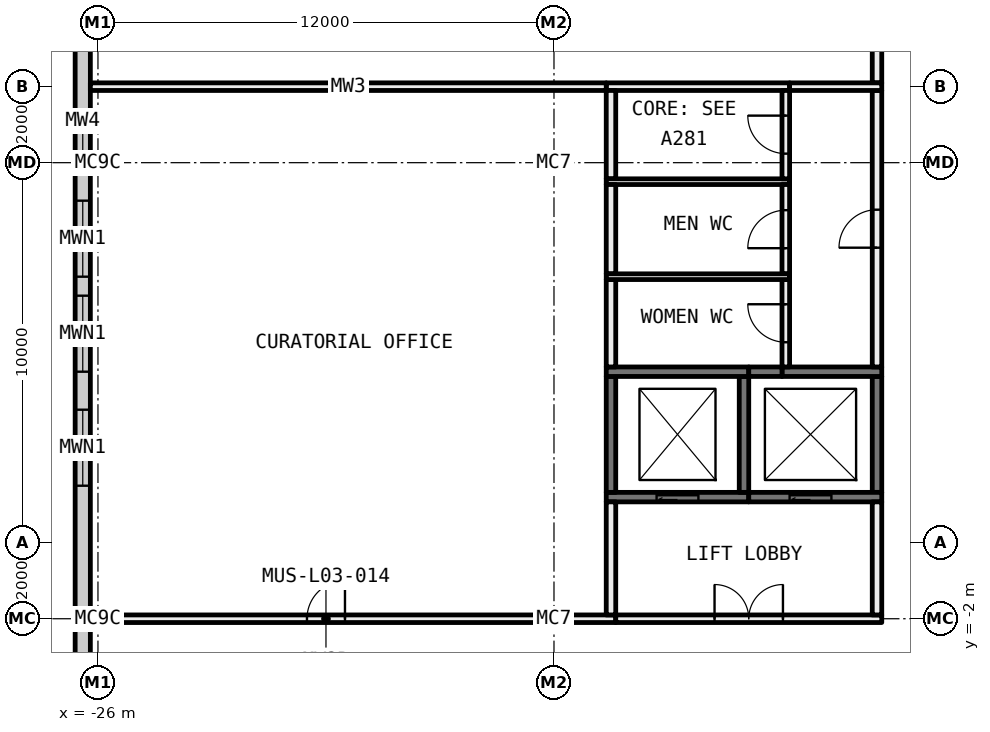
"""IFC4 building model, lengths in metres.
Left out: names, types, materials, properties, quantities, classifications, styles, units other than length and angle.
Written with IfcOpenShell. Run it as: python <this file> out.ifc"""

import sys

from ifc_helpers import new_model, si_unit, direction, frame, frame_2d, origin, origin_2d, place, context, subcontext, project, spatial, rectangle, i_section, extrude, element, fill, save


model = new_model("IFC4")
c1 = context("Model", 3, precision=1e-05, world=origin(), true_north=direction((0.0, 1.0)))
c2 = subcontext(c1, "Body", "Model", "MODEL_VIEW")
j1 = project(units=[si_unit("LENGTHUNIT", "METRE"), si_unit("PLANEANGLEUNIT", "RADIAN")], contexts=[c1])
p1 = place(None, origin())
s1 = spatial("IfcSite", under=j1, at=p1, CompositionType="ELEMENT")
p2 = place(p1, origin())
s2 = spatial("IfcBuilding", under=s1, at=p2, CompositionType="ELEMENT")
p3 = place(p2, frame((0.0, 0.0, 18.0)))
s3 = spatial("IfcBuildingStorey", under=s2, at=p3, CompositionType="ELEMENT", Elevation=18.0)
for number, where, z_axis, x_axis in (
    (1, (-26.0, -2.0, 0.0), (0.0, 0.0, 1.0), (1.0, 0.0, 0.0)),
    (2, (-26.0, 10.0, 0.0), (0.0, 0.0, 1.0), (1.0, 0.0, 0.0)),
):
    element("IfcColumn", number, at=place(p3, frame(where, z_axis=z_axis, x_axis=x_axis)), inside=s3, PredefinedType="COLUMN", context=c2, shape_type="SweptSolid", body=[
        extrude(i_section(OverallWidth=0.4, OverallDepth=0.4, WebThickness=0.013, FlangeThickness=0.021, FilletRadius=0.022, at=origin_2d()), origin(), (0.0, 0.0, 1.0), 5.6),
    ])
for number, where, z_axis, x_axis in (
    (3, (-14.0, -2.0, 0.0), (0.0, 0.0, 1.0), (1.0, 0.0, 0.0)),
    (4, (-14.0, 10.0, 0.0), (0.0, 0.0, 1.0), (1.0, 0.0, 0.0)),
):
    element("IfcColumn", number, at=place(p3, frame(where, z_axis=z_axis, x_axis=x_axis)), inside=s3, PredefinedType="COLUMN", context=c2, shape_type="SweptSolid", body=[
        extrude(i_section(OverallWidth=0.35, OverallDepth=0.35, WebThickness=0.012, FlangeThickness=0.019, FilletRadius=0.013, at=origin_2d()), origin(), (0.0, 0.0, 1.0), 5.6),
    ])
p4 = place(p3, frame((-12.625, 12.0, 0.0), z_axis=(0.0, 0.0, 1.0), x_axis=(1.0, 0.0, 0.0)))
e5 = element("IfcWall", 5, at=p4, inside=s3, PredefinedType="PARTITIONING", context=c2, shape_type="SweptSolid", body=[
    extrude(rectangle(XDim=4.825, YDim=0.2, at=frame_2d((2.413, 0.0))), origin(), (0.0, 0.0, 1.0), 5.6),
])
p5 = place(p3, frame((-12.5, 9.575, 0.0), z_axis=(0.0, 0.0, 1.0), x_axis=(0.0, 1.0, 0.0)))
e6 = element("IfcWall", 6, at=p5, inside=s3, PredefinedType="PARTITIONING", context=c2, shape_type="SweptSolid", body=[
    extrude(rectangle(XDim=2.325, YDim=0.25, at=frame_2d((1.163, 0.0))), origin(), (0.0, 0.0, 1.0), 5.6),
])
p6 = place(p3, frame((-5.5, 12.1, 0.0), z_axis=(0.0, 0.0, 1.0), x_axis=(0.0, 1.0, 0.0)))
e7 = element("IfcWall", 7, at=p6, inside=s3, PredefinedType="PARTITIONING", context=c2, shape_type="SweptSolid", body=[
    extrude(rectangle(XDim=13.825, YDim=0.25, at=frame_2d((6.913, 0.0))), origin(), (0.0, 0.0, 1.0), 5.6),
])
p7 = place(p6, frame((6.413, 0.0, 0.0)))
e8 = element("IfcOpeningElement", 8, at=p7, cuts=e7, PredefinedType="OPENING", context=c2, shape_type="SweptSolid", body=[
    extrude(rectangle(XDim=1.0, YDim=2.1, at=frame_2d((0.5, 1.05))), frame((0.0, 0.135, 0.0), z_axis=(0.0, -1.0, 0.0), x_axis=(1.0, 0.0, 0.0)), (0.0, 0.0, 1.0), 0.27),
])
p8 = place(p3, frame((-25.8, -2.0, 0.0), z_axis=(0.0, 0.0, 1.0), x_axis=(1.0, 0.0, 0.0)))
e9 = element("IfcWall", 9, at=p8, inside=s3, PredefinedType="PARTITIONING", context=c2, shape_type="SweptSolid", body=[
    extrude(rectangle(XDim=11.6, YDim=0.2, at=frame_2d((5.8, 0.0))), origin(), (0.0, 0.0, 1.0), 5.112),
])
p9 = place(p8, frame((5.3, 0.0, 0.0)))
e10 = element("IfcOpeningElement", 10, at=p9, cuts=e9, PredefinedType="OPENING", context=c2, shape_type="SweptSolid", body=[
    extrude(rectangle(XDim=1.0, YDim=2.1, at=frame_2d((0.5, 1.05))), frame((0.0, 0.11, 0.0), z_axis=(0.0, -1.0, 0.0), x_axis=(1.0, 0.0, 0.0)), (0.0, 0.0, 1.0), 0.22),
])
p10 = place(p3, frame((-13.8, -2.0, 0.0), z_axis=(0.0, 0.0, 1.0), x_axis=(1.0, 0.0, 0.0)))
e11 = element("IfcWall", 11, at=p10, inside=s3, PredefinedType="PARTITIONING", context=c2, shape_type="SweptSolid", body=[
    extrude(rectangle(XDim=1.425, YDim=0.2, at=frame_2d((0.712, 0.0))), origin(), (0.0, 0.0, 1.0), 5.112),
])
p11 = place(p3, frame((-12.375, -2.0, 0.0), z_axis=(0.0, 0.0, 1.0), x_axis=(1.0, 0.0, 0.0)))
e12 = element("IfcWall", 12, at=p11, inside=s3, PredefinedType="PARTITIONING", context=c2, shape_type="SweptSolid", body=[
    extrude(rectangle(XDim=7.0, YDim=0.2, at=frame_2d((3.5, 0.0))), origin(), (0.0, 0.0, 1.0), 5.112),
])
p12 = place(p11, frame((2.6, 0.0, 0.0)))
e13 = element("IfcOpeningElement", 13, at=p12, cuts=e12, PredefinedType="OPENING", context=c2, shape_type="SweptSolid", body=[
    extrude(rectangle(XDim=1.8, YDim=2.1, at=frame_2d((0.9, 1.05))), frame((0.0, 0.11, 0.0), z_axis=(0.0, -1.0, 0.0), x_axis=(1.0, 0.0, 0.0)), (0.0, 0.0, 1.0), 0.22),
])
p13 = place(p3, frame((-5.5, -1.9, 0.0), z_axis=(0.0, 0.0, 1.0), x_axis=(0.0, 1.0, 0.0)))
e14 = element("IfcWall", 14, at=p13, inside=s3, PredefinedType="PARTITIONING", context=c2, shape_type="SweptSolid", body=[
    extrude(rectangle(XDim=2.975, YDim=0.25, at=frame_2d((1.487, 0.0))), origin(), (0.0, 0.0, 1.0), 5.6),
])
p14 = place(p3, frame((-5.5, 1.325, 0.0), z_axis=(0.0, 0.0, 1.0), x_axis=(0.0, 1.0, 0.0)))
e15 = element("IfcWall", 15, at=p14, inside=s3, PredefinedType="SHEAR", context=c2, shape_type="SweptSolid", body=[
    extrude(rectangle(XDim=3.05, YDim=0.25, at=frame_2d((1.525, 0.0))), origin(), (0.0, 0.0, 1.0), 5.6),
])
p15 = place(p3, frame((-5.5, 4.625, 0.0), z_axis=(0.0, 0.0, 1.0), x_axis=(0.0, 1.0, 0.0)))
e16 = element("IfcWall", 16, at=p15, inside=s3, PredefinedType="PARTITIONING", context=c2, shape_type="SweptSolid", body=[
    extrude(rectangle(XDim=7.275, YDim=0.25, at=frame_2d((3.637, 0.0))), origin(), (0.0, 0.0, 1.0), 5.6),
])
p16 = place(p15, frame((3.138, 0.0, 0.0)))
e17 = element("IfcOpeningElement", 17, at=p16, cuts=e16, PredefinedType="OPENING", context=c2, shape_type="SweptSolid", body=[
    extrude(rectangle(XDim=1.0, YDim=2.1, at=frame_2d((0.5, 1.05))), frame((0.0, 0.135, 0.0), z_axis=(0.0, -1.0, 0.0), x_axis=(1.0, 0.0, 0.0)), (0.0, 0.0, 1.0), 0.27),
])
p17 = place(p3, frame((-26.2, 12.0, 0.0), z_axis=(0.0, 0.0, 1.0), x_axis=(1.0, 0.0, 0.0)))
e18 = element("IfcWall", 18, at=p17, inside=s3, PredefinedType="PARTITIONING", context=c2, shape_type="SweptSolid", body=[
    extrude(rectangle(XDim=13.575, YDim=0.2, at=frame_2d((6.788, 0.0))), origin(), (0.0, 0.0, 1.0), 5.6),
])
p18 = place(p3, frame((-12.5, -1.9, 0.0), z_axis=(0.0, 0.0, 1.0), x_axis=(0.0, 1.0, 0.0)))
e19 = element("IfcWall", 19, at=p18, inside=s3, PredefinedType="PARTITIONING", context=c2, shape_type="SweptSolid", body=[
    extrude(rectangle(XDim=2.975, YDim=0.25, at=frame_2d((1.487, 0.0))), origin(), (0.0, 0.0, 1.0), 5.6),
])
p19 = place(p3, frame((-12.625, 1.2, 0.0), z_axis=(0.0, 0.0, 1.0), x_axis=(1.0, 0.0, 0.0)))
e20 = element("IfcWall", 20, at=p19, inside=s3, PredefinedType="SHEAR", context=c2, shape_type="SweptSolid", body=[
    extrude(rectangle(XDim=3.75, YDim=0.25, at=frame_2d((1.875, 0.0))), origin(), (0.0, 0.0, 1.0), 5.6),
])
p20 = place(p19, frame((1.325, 0.0, 0.0)))
e21 = element("IfcOpeningElement", 21, at=p20, cuts=e20, PredefinedType="OPENING", context=c2, shape_type="SweptSolid", body=[
    extrude(rectangle(XDim=1.1, YDim=2.1, at=frame_2d((0.55, 1.05))), frame((0.0, 0.135, 0.0), z_axis=(0.0, -1.0, 0.0), x_axis=(1.0, 0.0, 0.0)), (0.0, 0.0, 1.0), 0.27),
])
p21 = place(p3, frame((-8.875, 1.2, 0.0), z_axis=(0.0, 0.0, 1.0), x_axis=(1.0, 0.0, 0.0)))
e22 = element("IfcWall", 22, at=p21, inside=s3, PredefinedType="SHEAR", context=c2, shape_type="SweptSolid", body=[
    extrude(rectangle(XDim=3.5, YDim=0.25, at=frame_2d((1.75, 0.0))), origin(), (0.0, 0.0, 1.0), 5.6),
])
p22 = place(p21, frame((1.075, 0.0, 0.0)))
e23 = element("IfcOpeningElement", 23, at=p22, cuts=e22, PredefinedType="OPENING", context=c2, shape_type="SweptSolid", body=[
    extrude(rectangle(XDim=1.1, YDim=2.1, at=frame_2d((0.55, 1.05))), frame((0.0, 0.135, 0.0), z_axis=(0.0, -1.0, 0.0), x_axis=(1.0, 0.0, 0.0)), (0.0, 0.0, 1.0), 0.27),
])
p23 = place(p3, frame((-12.625, 9.5, 0.0), z_axis=(0.0, 0.0, 1.0), x_axis=(1.0, 0.0, 0.0)))
e24 = element("IfcWall", 24, at=p23, inside=s3, PredefinedType="PARTITIONING", context=c2, shape_type="SweptSolid", body=[
    extrude(rectangle(XDim=4.825, YDim=0.15, at=frame_2d((2.413, 0.0))), origin(), (0.0, 0.0, 1.0), 5.6),
])
p24 = place(p3, frame((-12.5, 7.075, 0.0), z_axis=(0.0, 0.0, 1.0), x_axis=(0.0, 1.0, 0.0)))
e25 = element("IfcWall", 25, at=p24, inside=s3, PredefinedType="PARTITIONING", context=c2, shape_type="SweptSolid", body=[
    extrude(rectangle(XDim=2.35, YDim=0.25, at=frame_2d((1.175, 0.0))), origin(), (0.0, 0.0, 1.0), 5.6),
])
for number, where, z_axis, x_axis in (
    (26, (-12.5, 1.325, 0.0), (0.0, 0.0, 1.0), (0.0, 1.0, 0.0)),
    (27, (-9.0, 1.325, 0.0), (0.0, 0.0, 1.0), (0.0, 1.0, 0.0)),
):
    element("IfcWall", number, at=place(p3, frame(where, z_axis=z_axis, x_axis=x_axis)), inside=s3, PredefinedType="SHEAR", context=c2, shape_type="SweptSolid", body=[
        extrude(rectangle(XDim=3.05, YDim=0.25, at=frame_2d((1.525, 0.0))), origin(), (0.0, 0.0, 1.0), 5.6),
    ])
p25 = place(p3, frame((-12.625, 4.5, 0.0), z_axis=(0.0, 0.0, 1.0), x_axis=(1.0, 0.0, 0.0)))
e28 = element("IfcWall", 28, at=p25, inside=s3, PredefinedType="SHEAR", context=c2, shape_type="SweptSolid", body=[
    extrude(rectangle(XDim=3.75, YDim=0.25, at=frame_2d((1.875, 0.0))), origin(), (0.0, 0.0, 1.0), 5.6),
])
p26 = place(p3, frame((-8.0, 4.5, 0.0), z_axis=(0.0, 0.0, 1.0), x_axis=(1.0, 0.0, 0.0)))
e29 = element("IfcWall", 29, at=p26, inside=s3, PredefinedType="SHEAR", context=c2, shape_type="SweptSolid", body=[
    extrude(rectangle(XDim=2.625, YDim=0.25, at=frame_2d((1.312, 0.0))), origin(), (0.0, 0.0, 1.0), 5.6),
])
p27 = place(p3, frame((-8.875, 4.5, 0.0), z_axis=(0.0, 0.0, 1.0), x_axis=(1.0, 0.0, 0.0)))
e30 = element("IfcWall", 30, at=p27, inside=s3, PredefinedType="SHEAR", context=c2, shape_type="SweptSolid", body=[
    extrude(rectangle(XDim=0.875, YDim=0.25, at=frame_2d((0.438, 0.0))), origin(), (0.0, 0.0, 1.0), 5.6),
])
p28 = place(p3, frame((-7.9, 9.575, 0.0), z_axis=(0.0, 0.0, 1.0), x_axis=(0.0, 1.0, 0.0)))
e31 = element("IfcWall", 31, at=p28, inside=s3, PredefinedType="PARTITIONING", context=c2, shape_type="SweptSolid", body=[
    extrude(rectangle(XDim=2.325, YDim=0.2, at=frame_2d((1.163, 0.0))), origin(), (0.0, 0.0, 1.0), 5.6),
])
p29 = place(p28, frame((0.663, 0.0, 0.0)))
e32 = element("IfcOpeningElement", 32, at=p29, cuts=e31, PredefinedType="OPENING", context=c2, shape_type="SweptSolid", body=[
    extrude(rectangle(XDim=1.0, YDim=2.1, at=frame_2d((0.5, 1.05))), frame((0.0, 0.11, 0.0), z_axis=(0.0, -1.0, 0.0), x_axis=(1.0, 0.0, 0.0)), (0.0, 0.0, 1.0), 0.22),
])
p30 = place(p3, frame((-7.8, 12.0, 0.0), z_axis=(0.0, 0.0, 1.0), x_axis=(1.0, 0.0, 0.0)))
e33 = element("IfcWall", 33, at=p30, inside=s3, PredefinedType="PARTITIONING", context=c2, shape_type="SweptSolid", body=[
    extrude(rectangle(XDim=2.425, YDim=0.2, at=frame_2d((1.212, 0.0))), origin(), (0.0, 0.0, 1.0), 5.6),
])
p31 = place(p3, frame((-7.9, 7.075, 0.0), z_axis=(0.0, 0.0, 1.0), x_axis=(0.0, 1.0, 0.0)))
e34 = element("IfcWall", 34, at=p31, inside=s3, PredefinedType="PARTITIONING", context=c2, shape_type="SweptSolid", body=[
    extrude(rectangle(XDim=2.35, YDim=0.2, at=frame_2d((1.175, 0.0))), origin(), (0.0, 0.0, 1.0), 5.6),
])
p32 = place(p31, frame((0.675, 0.0, 0.0)))
e35 = element("IfcOpeningElement", 35, at=p32, cuts=e34, PredefinedType="OPENING", context=c2, shape_type="SweptSolid", body=[
    extrude(rectangle(XDim=1.0, YDim=2.1, at=frame_2d((0.5, 1.05))), frame((0.0, 0.11, 0.0), z_axis=(0.0, -1.0, 0.0), x_axis=(1.0, 0.0, 0.0)), (0.0, 0.0, 1.0), 0.22),
])
p33 = place(p3, frame((-7.9, 4.625, 0.0), z_axis=(0.0, 0.0, 1.0), x_axis=(0.0, 1.0, 0.0)))
e36 = element("IfcWall", 36, at=p33, inside=s3, PredefinedType="PARTITIONING", context=c2, shape_type="SweptSolid", body=[
    extrude(rectangle(XDim=2.3, YDim=0.2, at=frame_2d((1.15, 0.0))), origin(), (0.0, 0.0, 1.0), 5.6),
])
p34 = place(p33, frame((0.65, 0.0, 0.0)))
e37 = element("IfcOpeningElement", 37, at=p34, cuts=e36, PredefinedType="OPENING", context=c2, shape_type="SweptSolid", body=[
    extrude(rectangle(XDim=1.0, YDim=2.1, at=frame_2d((0.5, 1.05))), frame((0.0, 0.11, 0.0), z_axis=(0.0, -1.0, 0.0), x_axis=(1.0, 0.0, 0.0)), (0.0, 0.0, 1.0), 0.22),
])
p35 = place(p3, frame((-12.5, 4.625, 0.0), z_axis=(0.0, 0.0, 1.0), x_axis=(0.0, 1.0, 0.0)))
e38 = element("IfcWall", 38, at=p35, inside=s3, PredefinedType="PARTITIONING", context=c2, shape_type="SweptSolid", body=[
    extrude(rectangle(XDim=2.3, YDim=0.25, at=frame_2d((1.15, 0.0))), origin(), (0.0, 0.0, 1.0), 5.6),
])
p36 = place(p3, frame((-12.625, 7.0, 0.0), z_axis=(0.0, 0.0, 1.0), x_axis=(1.0, 0.0, 0.0)))
e39 = element("IfcWall", 39, at=p36, inside=s3, PredefinedType="PARTITIONING", context=c2, shape_type="SweptSolid", body=[
    extrude(rectangle(XDim=4.825, YDim=0.15, at=frame_2d((2.413, 0.0))), origin(), (0.0, 0.0, 1.0), 5.6),
])
p37 = place(p3, frame((-26.4, -26.2, -0.4), z_axis=(0.0, 0.0, 1.0), x_axis=(0.0, 1.0, 0.0)))
e40 = element("IfcWall", 40, at=p37, inside=s3, PredefinedType="STANDARD", context=c2, shape_type="SweptSolid", body=[
    extrude(rectangle(XDim=72.4, YDim=0.4, at=frame_2d((36.2, 0.0))), origin(), (0.0, 0.0, 1.0), 6.0),
])
p38 = place(p37, frame((27.7, 0.0, 1.3)))
e41 = element("IfcOpeningElement", 41, at=p38, cuts=e40, PredefinedType="OPENING", context=c2, shape_type="SweptSolid", body=[
    extrude(rectangle(XDim=2.0, YDim=3.6, at=frame_2d((1.0, 1.8))), frame((0.0, 0.21, 0.0), z_axis=(0.0, -1.0, 0.0), x_axis=(1.0, 0.0, 0.0)), (0.0, 0.0, 1.0), 0.42),
])
p39 = place(p37, frame((30.7, 0.0, 1.3)))
e42 = element("IfcOpeningElement", 42, at=p39, cuts=e40, PredefinedType="OPENING", context=c2, shape_type="SweptSolid", body=[
    extrude(rectangle(XDim=2.0, YDim=3.6, at=frame_2d((1.0, 1.8))), frame((0.0, 0.21, 0.0), z_axis=(0.0, -1.0, 0.0), x_axis=(1.0, 0.0, 0.0)), (0.0, 0.0, 1.0), 0.42),
])
p40 = place(p37, frame((33.2, 0.0, 1.3)))
e43 = element("IfcOpeningElement", 43, at=p40, cuts=e40, PredefinedType="OPENING", context=c2, shape_type="SweptSolid", body=[
    extrude(rectangle(XDim=2.0, YDim=3.6, at=frame_2d((1.0, 1.8))), frame((0.0, 0.21, 0.0), z_axis=(0.0, -1.0, 0.0), x_axis=(1.0, 0.0, 0.0)), (0.0, 0.0, 1.0), 0.42),
])
p41 = place(p37, frame((39.7, 0.0, 1.3)))
e44 = element("IfcOpeningElement", 44, at=p41, cuts=e40, PredefinedType="OPENING", context=c2, shape_type="SweptSolid", body=[
    extrude(rectangle(XDim=2.0, YDim=3.6, at=frame_2d((1.0, 1.8))), frame((0.0, 0.21, 0.0), z_axis=(0.0, -1.0, 0.0), x_axis=(1.0, 0.0, 0.0)), (0.0, 0.0, 1.0), 0.42),
])
p42 = place(p37, frame((42.7, 0.0, 1.3)))
e45 = element("IfcOpeningElement", 45, at=p42, cuts=e40, PredefinedType="OPENING", context=c2, shape_type="SweptSolid", body=[
    extrude(rectangle(XDim=2.0, YDim=3.6, at=frame_2d((1.0, 1.8))), frame((0.0, 0.21, 0.0), z_axis=(0.0, -1.0, 0.0), x_axis=(1.0, 0.0, 0.0)), (0.0, 0.0, 1.0), 0.42),
])
p43 = place(p37, frame((49.7, 0.0, 1.3)))
e46 = element("IfcOpeningElement", 46, at=p43, cuts=e40, PredefinedType="OPENING", context=c2, shape_type="SweptSolid", body=[
    extrude(rectangle(XDim=2.0, YDim=3.6, at=frame_2d((1.0, 1.8))), frame((0.0, 0.21, 0.0), z_axis=(0.0, -1.0, 0.0), x_axis=(1.0, 0.0, 0.0)), (0.0, 0.0, 1.0), 0.42),
])
p44 = place(p37, frame((53.7, 0.0, 1.3)))
e47 = element("IfcOpeningElement", 47, at=p44, cuts=e40, PredefinedType="OPENING", context=c2, shape_type="SweptSolid", body=[
    extrude(rectangle(XDim=2.0, YDim=3.6, at=frame_2d((1.0, 1.8))), frame((0.0, 0.21, 0.0), z_axis=(0.0, -1.0, 0.0), x_axis=(1.0, 0.0, 0.0)), (0.0, 0.0, 1.0), 0.42),
])
p45 = place(p37, frame((56.7, 0.0, 1.3)))
e48 = element("IfcOpeningElement", 48, at=p45, cuts=e40, PredefinedType="OPENING", context=c2, shape_type="SweptSolid", body=[
    extrude(rectangle(XDim=2.0, YDim=3.6, at=frame_2d((1.0, 1.8))), frame((0.0, 0.21, 0.0), z_axis=(0.0, -1.0, 0.0), x_axis=(1.0, 0.0, 0.0)), (0.0, 0.0, 1.0), 0.42),
])
p46 = place(p37, frame((62.2, 0.0, 1.3)))
e49 = element("IfcOpeningElement", 49, at=p46, cuts=e40, PredefinedType="OPENING", context=c2, shape_type="SweptSolid", body=[
    extrude(rectangle(XDim=2.0, YDim=3.6, at=frame_2d((1.0, 1.8))), frame((0.0, 0.21, 0.0), z_axis=(0.0, -1.0, 0.0), x_axis=(1.0, 0.0, 0.0)), (0.0, 0.0, 1.0), 0.42),
])
p47 = place(p37, frame((65.7, 0.0, 1.3)))
e50 = element("IfcOpeningElement", 50, at=p47, cuts=e40, PredefinedType="OPENING", context=c2, shape_type="SweptSolid", body=[
    extrude(rectangle(XDim=2.0, YDim=3.6, at=frame_2d((1.0, 1.8))), frame((0.0, 0.21, 0.0), z_axis=(0.0, -1.0, 0.0), x_axis=(1.0, 0.0, 0.0)), (0.0, 0.0, 1.0), 0.42),
])
p48 = place(p38, origin())
e51 = element("IfcWindow", 51, at=p48, inside=s3, PartitioningType="SINGLE_PANEL", PredefinedType="WINDOW", context=c2, shape_type="SweptSolid", body=[
    extrude(rectangle(XDim=2.0, YDim=3.6, at=frame_2d((1.0, 1.8))), frame((0.0, 0.03, 0.0), z_axis=(0.0, -1.0, 0.0), x_axis=(1.0, 0.0, 0.0)), (0.0, 0.0, 1.0), 0.06),
])
fill(e41, e51)
p49 = place(p39, origin())
e52 = element("IfcWindow", 52, at=p49, inside=s3, PartitioningType="SINGLE_PANEL", PredefinedType="WINDOW", context=c2, shape_type="SweptSolid", body=[
    extrude(rectangle(XDim=2.0, YDim=3.6, at=frame_2d((1.0, 1.8))), frame((0.0, 0.03, 0.0), z_axis=(0.0, -1.0, 0.0), x_axis=(1.0, 0.0, 0.0)), (0.0, 0.0, 1.0), 0.06),
])
fill(e42, e52)
p50 = place(p40, origin())
e53 = element("IfcWindow", 53, at=p50, inside=s3, PartitioningType="SINGLE_PANEL", PredefinedType="WINDOW", context=c2, shape_type="SweptSolid", body=[
    extrude(rectangle(XDim=2.0, YDim=3.6, at=frame_2d((1.0, 1.8))), frame((0.0, 0.03, 0.0), z_axis=(0.0, -1.0, 0.0), x_axis=(1.0, 0.0, 0.0)), (0.0, 0.0, 1.0), 0.06),
])
fill(e43, e53)
p51 = place(p12, origin())
e54 = element("IfcDoor", 54, at=p51, inside=s3, OperationType="DOUBLE_DOOR_SINGLE_SWING", PredefinedType="DOOR", context=c2, shape_type="SweptSolid", body=[
    extrude(rectangle(XDim=1.8, YDim=2.1, at=frame_2d((0.9, 1.05))), frame((0.0, 0.025, 0.0), z_axis=(0.0, -1.0, 0.0), x_axis=(1.0, 0.0, 0.0)), (0.0, 0.0, 1.0), 0.05),
])
fill(e13, e54)
p52 = place(p20, origin())
e55 = element("IfcDoor", 55, at=p52, inside=s3, OperationType="SLIDING_TO_LEFT", PredefinedType="DOOR", context=c2, shape_type="SweptSolid", body=[
    extrude(rectangle(XDim=1.1, YDim=2.1, at=frame_2d((0.55, 1.05))), frame((0.0, 0.025, 0.0), z_axis=(0.0, -1.0, 0.0), x_axis=(1.0, 0.0, 0.0)), (0.0, 0.0, 1.0), 0.05),
])
fill(e21, e55)
p53 = place(p22, origin())
e56 = element("IfcDoor", 56, at=p53, inside=s3, OperationType="SLIDING_TO_LEFT", PredefinedType="DOOR", context=c2, shape_type="SweptSolid", body=[
    extrude(rectangle(XDim=1.1, YDim=2.1, at=frame_2d((0.55, 1.05))), frame((0.0, 0.025, 0.0), z_axis=(0.0, -1.0, 0.0), x_axis=(1.0, 0.0, 0.0)), (0.0, 0.0, 1.0), 0.05),
])
fill(e23, e56)
p54 = place(p16, origin())
e57 = element("IfcDoor", 57, at=p54, inside=s3, OperationType="SINGLE_SWING_RIGHT", PredefinedType="DOOR", context=c2, shape_type="SweptSolid", body=[
    extrude(rectangle(XDim=1.0, YDim=2.1, at=frame_2d((0.5, 1.05))), frame((0.0, 0.025, 0.0), z_axis=(0.0, -1.0, 0.0), x_axis=(1.0, 0.0, 0.0)), (0.0, 0.0, 1.0), 0.05),
])
fill(e17, e57)
p55 = place(p34, origin())
e58 = element("IfcDoor", 58, at=p55, inside=s3, OperationType="SINGLE_SWING_LEFT", PredefinedType="DOOR", context=c2, shape_type="SweptSolid", body=[
    extrude(rectangle(XDim=1.0, YDim=2.1, at=frame_2d((0.5, 1.05))), frame((0.0, 0.025, 0.0), z_axis=(0.0, -1.0, 0.0), x_axis=(1.0, 0.0, 0.0)), (0.0, 0.0, 1.0), 0.05),
])
fill(e37, e58)
p56 = place(p32, origin())
e59 = element("IfcDoor", 59, at=p56, inside=s3, OperationType="SINGLE_SWING_RIGHT", PredefinedType="DOOR", context=c2, shape_type="SweptSolid", body=[
    extrude(rectangle(XDim=1.0, YDim=2.1, at=frame_2d((0.5, 1.05))), frame((0.0, 0.025, 0.0), z_axis=(0.0, -1.0, 0.0), x_axis=(1.0, 0.0, 0.0)), (0.0, 0.0, 1.0), 0.05),
])
fill(e35, e59)
p57 = place(p29, origin())
e60 = element("IfcDoor", 60, at=p57, inside=s3, OperationType="SINGLE_SWING_LEFT", PredefinedType="DOOR", context=c2, shape_type="SweptSolid", body=[
    extrude(rectangle(XDim=1.0, YDim=2.1, at=frame_2d((0.5, 1.05))), frame((0.0, 0.025, 0.0), z_axis=(0.0, -1.0, 0.0), x_axis=(1.0, 0.0, 0.0)), (0.0, 0.0, 1.0), 0.05),
])
fill(e32, e60)
p58 = place(p9, origin())
e61 = element("IfcDoor", 61, at=p58, inside=s3, OperationType="SINGLE_SWING_LEFT", PredefinedType="DOOR", context=c2, shape_type="SweptSolid", body=[
    extrude(rectangle(XDim=1.0, YDim=2.1, at=frame_2d((0.5, 1.05))), frame((0.0, 0.025, 0.0), z_axis=(0.0, -1.0, 0.0), x_axis=(1.0, 0.0, 0.0)), (0.0, 0.0, 1.0), 0.05),
])
fill(e10, e61)
save(model, sys.argv[1])
